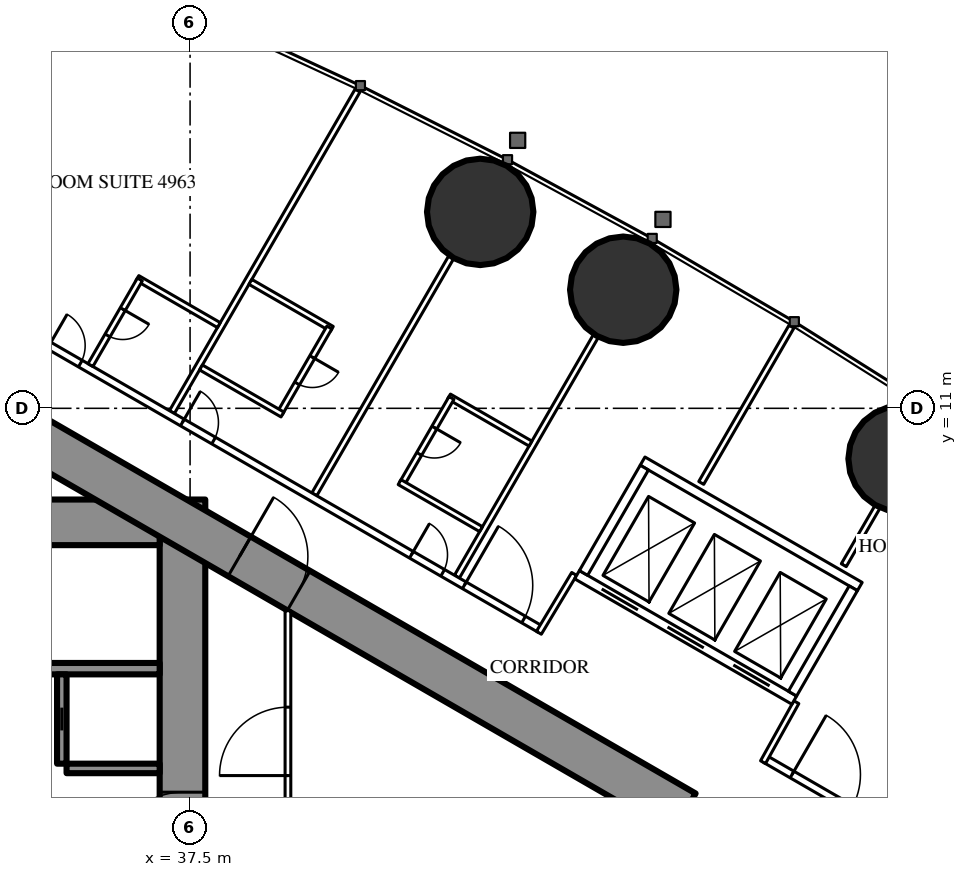
"""IFC4 building model, lengths in metres.
Left out: names, types, materials, properties, quantities, classifications, styles, units other than length and angle.
Written with IfcOpenShell. Run it as: python <this file> out.ifc"""

import sys

from ifc_helpers import new_model, si_unit, direction, frame, frame_2d, origin, origin_2d, place, context, subcontext, project, spatial, rectangle, circle, extrude, element, fill, save


model = new_model("IFC4")
c1 = context("Model", 3, precision=1e-05, world=origin(), true_north=direction((0.0, 1.0)))
c2 = subcontext(c1, "Body", "Model", "MODEL_VIEW")
j1 = project(units=[si_unit("LENGTHUNIT", "METRE"), si_unit("PLANEANGLEUNIT", "RADIAN")], contexts=[c1])
p1 = place(None, origin())
s1 = spatial("IfcSite", under=j1, at=p1, CompositionType="ELEMENT")
p2 = place(p1, origin())
s2 = spatial("IfcBuilding", under=s1, at=p2, CompositionType="ELEMENT")
p3 = place(p2, frame((0.0, 0.0, 184.3)))
s3 = spatial("IfcBuildingStorey", under=s2, at=p3, CompositionType="ELEMENT", Elevation=184.3)
for number, where, z_axis, x_axis in (
    (1, (56.221, 9.672, 0.0), (0.0, 0.0, 1.0), (1.0, 0.0, 0.0)),
    (2, (48.897, 14.121, 0.0), (0.0, 0.0, 1.0), (1.0, 0.0, 0.0)),
    (3, (45.134, 16.168, 0.0), (0.0, 0.0, 1.0), (1.0, 0.0, 0.0)),
):
    element("IfcColumn", number, at=place(p3, frame(where, z_axis=z_axis, x_axis=x_axis)), inside=s3, PredefinedType="COLUMN", context=c2, shape_type="SweptSolid", body=[
        extrude(circle(Radius=1.4, at=origin_2d()), origin(), (0.0, 0.0, 1.0), 3.5),
    ])
p4 = place(p3, frame((37.3, -8.6, 0.0), z_axis=(0.0, 0.0, 1.0), x_axis=(0.0, 1.0, 0.0)))
e4 = element("IfcWall", 4, at=p4, inside=s3, PredefinedType="SHEAR", context=c2, shape_type="SweptSolid", body=[
    extrude(rectangle(XDim=17.2, YDim=1.2, at=frame_2d((8.6, 0.0))), origin(), (0.0, 0.0, 1.0), 3.5),
])
p5 = place(p4, frame((7.7, 0.0, 0.0)))
e5 = element("IfcOpeningElement", 5, at=p5, cuts=e4, PredefinedType="OPENING", context=c2, shape_type="SweptSolid", body=[
    extrude(rectangle(XDim=1.8, YDim=2.2, at=frame_2d((0.9, 1.1))), frame((0.0, 0.61, 0.0), z_axis=(0.0, -1.0, 0.0), x_axis=(1.0, 0.0, 0.0)), (0.0, 0.0, 1.0), 1.22),
])
p6 = place(p3, frame((28.3, 8.0, 0.0), z_axis=(0.0, 0.0, 1.0), x_axis=(1.0, 0.0, 0.0)))
e6 = element("IfcWall", 6, at=p6, inside=s3, PredefinedType="SHEAR", context=c2, shape_type="SweptSolid", body=[
    extrude(rectangle(XDim=8.4, YDim=1.2, at=frame_2d((4.2, 0.0))), origin(), (0.0, 0.0, 1.0), 3.5),
])
p7 = place(p6, frame((0.25, 0.0, 0.0)))
e7 = element("IfcOpeningElement", 7, at=p7, cuts=e6, PredefinedType="OPENING", context=c2, shape_type="SweptSolid", body=[
    extrude(rectangle(XDim=1.0, YDim=2.2, at=frame_2d((0.5, 1.1))), frame((0.0, 0.61, 0.0), z_axis=(0.0, -1.0, 0.0), x_axis=(1.0, 0.0, 0.0)), (0.0, 0.0, 1.0), 1.22),
])
p8 = place(p3, frame((28.3, 4.15, 0.0), z_axis=(0.0, 0.0, 1.0), x_axis=(1.0, 0.0, 0.0)))
e8 = element("IfcWall", 8, at=p8, inside=s3, PredefinedType="SHEAR", context=c2, shape_type="SweptSolid", body=[
    extrude(rectangle(XDim=8.4, YDim=0.3, at=frame_2d((4.2, 0.0))), origin(), (0.0, 0.0, 1.0), 3.5),
])
p9 = place(p3, frame((34.125, 1.65, 0.0), z_axis=(0.0, 0.0, 1.0), x_axis=(0.0, 1.0, 0.0)))
e9 = element("IfcWall", 9, at=p9, inside=s3, PredefinedType="SHEAR", context=c2, shape_type="SweptSolid", body=[
    extrude(rectangle(XDim=2.35, YDim=0.25, at=frame_2d((1.175, 0.0))), origin(), (0.0, 0.0, 1.0), 3.5),
])
p10 = place(p9, frame((0.875, 0.0, 0.0)))
e10 = element("IfcOpeningElement", 10, at=p10, cuts=e9, PredefinedType="OPENING", context=c2, shape_type="SweptSolid", body=[
    extrude(rectangle(XDim=0.6, YDim=2.0, at=frame_2d((0.3, 1.0))), frame((0.0, 0.135, 0.0), z_axis=(0.0, -1.0, 0.0), x_axis=(1.0, 0.0, 0.0)), (0.0, 0.0, 1.0), 0.27),
])
p11 = place(p3, frame((34.25, 1.525, 0.0), z_axis=(0.0, 0.0, 1.0), x_axis=(1.0, 0.0, 0.0)))
e11 = element("IfcWall", 11, at=p11, inside=s3, PredefinedType="SHEAR", context=c2, shape_type="SweptSolid", body=[
    extrude(rectangle(XDim=2.45, YDim=0.25, at=frame_2d((1.225, 0.0))), origin(), (0.0, 0.0, 1.0), 3.5),
])
p12 = place(p3, frame((27.2, 13.8, 0.0), z_axis=(0.0, 0.0, 1.0), x_axis=(0.866024515034, -0.500001539357, 0.0)))
e12 = element("IfcWall", 12, at=p12, inside=s3, PredefinedType="SHEAR", context=c2, shape_type="SweptSolid", body=[
    extrude(rectangle(XDim=26.907, YDim=1.2, at=frame_2d((13.454, 0.0))), origin(), (0.0, 0.0, 1.0), 3.5),
])
p13 = place(p12, frame((4.6, 0.0, 0.0)))
e13 = element("IfcOpeningElement", 13, at=p13, cuts=e12, PredefinedType="OPENING", context=c2, shape_type="SweptSolid", body=[
    extrude(rectangle(XDim=1.0, YDim=2.2, at=frame_2d((0.5, 1.1))), frame((0.0, 0.61, 0.0), z_axis=(0.0, -1.0, 0.0), x_axis=(1.0, 0.0, 0.0)), (0.0, 0.0, 1.0), 1.22),
])
p14 = place(p12, frame((13.395, 0.0, 0.0)))
e14 = element("IfcOpeningElement", 14, at=p14, cuts=e12, PredefinedType="OPENING", context=c2, shape_type="SweptSolid", body=[
    extrude(rectangle(XDim=1.8, YDim=2.2, at=frame_2d((0.9, 1.1))), frame((0.0, 0.61, 0.0), z_axis=(0.0, -1.0, 0.0), x_axis=(1.0, 0.0, 0.0)), (0.0, 0.0, 1.0), 1.22),
])
p15 = place(p3, frame((37.022, 10.9, 0.0), z_axis=(0.0, 0.0, 1.0), x_axis=(0.499998620953, 0.866026199976, 0.0)))
e15 = element("IfcWall", 15, at=p15, inside=s3, PredefinedType="PARTITIONING", context=c2, shape_type="SweptSolid", body=[
    extrude(rectangle(XDim=9.77, YDim=0.15, at=frame_2d((4.885, 0.0))), origin(), (0.0, 0.0, 1.0), 3.25),
])
p16 = place(p3, frame((40.769, 8.737, 0.0), z_axis=(0.0, 0.0, 1.0), x_axis=(0.500013115284, 0.866017831539, 0.0)))
e16 = element("IfcWall", 16, at=p16, inside=s3, PredefinedType="PARTITIONING", context=c2, shape_type="SweptSolid", body=[
    extrude(rectangle(XDim=7.198, YDim=0.15, at=frame_2d((3.599, 0.0))), origin(), (0.0, 0.0, 1.0), 2.3),
])
p17 = place(p3, frame((44.521, 6.571, 0.0), z_axis=(0.0, 0.0, 1.0), x_axis=(0.500020376429, 0.866013639128, 0.0)))
e17 = element("IfcWall", 17, at=p17, inside=s3, PredefinedType="PARTITIONING", context=c2, shape_type="SweptSolid", body=[
    extrude(rectangle(XDim=7.306, YDim=0.15, at=frame_2d((3.653, 0.0))), origin(), (0.0, 0.0, 1.0), 2.3),
])
p18 = place(p3, frame((50.95, 9.037, 0.0), z_axis=(0.0, 0.0, 1.0), x_axis=(0.499988022762, 0.866032318735, 0.0)))
e18 = element("IfcWall", 18, at=p18, inside=s3, PredefinedType="PARTITIONING", context=c2, shape_type="SweptSolid", body=[
    extrude(rectangle(XDim=4.748, YDim=0.15, at=frame_2d((2.374, 0.0))), origin(), (0.0, 0.0, 1.0), 3.25),
])
p19 = place(p3, frame((54.7, 6.872, 0.0), z_axis=(0.0, 0.0, 1.0), x_axis=(0.499989690894, 0.866031355668, 0.0)))
e19 = element("IfcWall", 19, at=p19, inside=s3, PredefinedType="PARTITIONING", context=c2, shape_type="SweptSolid", body=[
    extrude(rectangle(XDim=1.766, YDim=0.15, at=frame_2d((0.883, 0.0))), origin(), (0.0, 0.0, 1.0), 3.25),
])
p20 = place(p3, frame((27.959, 16.017, 0.0), z_axis=(0.0, 0.0, 1.0), x_axis=(0.866027146794, -0.499996981007, 0.0)))
e20 = element("IfcWall", 20, at=p20, inside=s3, PredefinedType="PARTITIONING", context=c2, shape_type="SweptSolid", body=[
    extrude(rectangle(XDim=21.657, YDim=0.2, at=frame_2d((10.829, 0.0))), origin(), (0.0, 0.0, 1.0), 3.25),
])
p21 = place(p20, frame((17.741, 0.0, 0.0)))
e21 = element("IfcOpeningElement", 21, at=p21, cuts=e20, PredefinedType="OPENING", context=c2, shape_type="SweptSolid", body=[
    extrude(rectangle(XDim=0.95, YDim=2.2, at=frame_2d((0.475, 1.1))), frame((0.0, 0.11, 0.0), z_axis=(0.0, -1.0, 0.0), x_axis=(1.0, 0.0, 0.0)), (0.0, 0.0, 1.0), 0.22),
])
p22 = place(p20, frame((10.782, 0.0, 0.0)))
e22 = element("IfcOpeningElement", 22, at=p22, cuts=e20, PredefinedType="OPENING", context=c2, shape_type="SweptSolid", body=[
    extrude(rectangle(XDim=0.95, YDim=2.2, at=frame_2d((0.475, 1.1))), frame((0.0, 0.11, 0.0), z_axis=(0.0, -1.0, 0.0), x_axis=(1.0, 0.0, 0.0)), (0.0, 0.0, 1.0), 0.22),
])
p23 = place(p20, frame((6.732, 0.0, 0.0)))
e23 = element("IfcOpeningElement", 23, at=p23, cuts=e20, PredefinedType="OPENING", context=c2, shape_type="SweptSolid", body=[
    extrude(rectangle(XDim=0.95, YDim=2.2, at=frame_2d((0.475, 1.1))), frame((0.0, 0.11, 0.0), z_axis=(0.0, -1.0, 0.0), x_axis=(1.0, 0.0, 0.0)), (0.0, 0.0, 1.0), 0.22),
])
p24 = place(p20, frame((19.349, 0.0, 0.0)))
e24 = element("IfcOpeningElement", 24, at=p24, cuts=e20, PredefinedType="OPENING", context=c2, shape_type="SweptSolid", body=[
    extrude(rectangle(XDim=1.8, YDim=2.2, at=frame_2d((0.9, 1.1))), frame((0.0, 0.11, 0.0), z_axis=(0.0, -1.0, 0.0), x_axis=(1.0, 0.0, 0.0)), (0.0, 0.0, 1.0), 0.22),
])
p25 = place(p3, frame((52.639, 1.769, 0.0), z_axis=(0.0, 0.0, 1.0), x_axis=(0.866027340901, -0.4999966448, 0.0)))
e25 = element("IfcWall", 25, at=p25, inside=s3, PredefinedType="PARTITIONING", context=c2, shape_type="SweptSolid", body=[
    extrude(rectangle(XDim=3.417, YDim=0.2, at=frame_2d((1.708, 0.0))), origin(), (0.0, 0.0, 1.0), 3.25),
])
p26 = place(p25, frame((0.809, 0.0, 0.0)))
e26 = element("IfcOpeningElement", 26, at=p26, cuts=e25, PredefinedType="OPENING", context=c2, shape_type="SweptSolid", body=[
    extrude(rectangle(XDim=1.8, YDim=2.2, at=frame_2d((0.9, 1.1))), frame((0.0, 0.11, 0.0), z_axis=(0.0, -1.0, 0.0), x_axis=(1.0, 0.0, 0.0)), (0.0, 0.0, 1.0), 0.22),
])
for number, where, z_axis, x_axis in (
    (27, (52.576, 1.689, 0.0), (0.0, 0.0, 1.0), (0.485, 0.874, 0.0)),
    (28, (47.606, 6.643, 0.0), (0.0, 0.0, 1.0), (-0.514, -0.858, 0.0)),
):
    element("IfcWall", number, at=place(p3, frame(where, z_axis=z_axis, x_axis=x_axis)), inside=s3, PredefinedType="PARTITIONING", context=c2, shape_type="SweptSolid", body=[
        extrude(rectangle(XDim=1.805, YDim=0.15, at=frame_2d((0.902, 0.0))), origin(), (0.0, 0.0, 1.0), 3.25),
    ])
p27 = place(p3, frame((44.313, 11.31, 0.0), z_axis=(0.0, 0.0, 1.0), x_axis=(0.866031185235, -0.4999899861, 0.0)))
e29 = element("IfcWall", 29, at=p27, inside=s3, PredefinedType="PARTITIONING", context=c2, shape_type="SweptSolid", body=[
    extrude(rectangle(XDim=2.475, YDim=0.15, at=frame_2d((1.238, 0.0))), origin(), (0.0, 0.0, 1.0), 3.25),
])
p28 = place(p3, frame((43.078, 9.021, 0.0), z_axis=(0.0, 0.0, 1.0), x_axis=(0.49997716683, 0.86603858612, 0.0)))
e30 = element("IfcWall", 30, at=p28, inside=s3, PredefinedType="PARTITIONING", context=c2, shape_type="SweptSolid", body=[
    extrude(rectangle(XDim=2.6, YDim=0.15, at=frame_2d((1.3, 0.0))), origin(), (0.0, 0.0, 1.0), 3.25),
])
p29 = place(p28, frame((0.9, 0.0, 0.0)))
e31 = element("IfcOpeningElement", 31, at=p29, cuts=e30, PredefinedType="OPENING", context=c2, shape_type="SweptSolid", body=[
    extrude(rectangle(XDim=0.8, YDim=2.2, at=frame_2d((0.4, 1.1))), frame((0.0, 0.085, 0.0), z_axis=(0.0, -1.0, 0.0), x_axis=(1.0, 0.0, 0.0)), (0.0, 0.0, 1.0), 0.17),
])
p30 = place(p3, frame((43.013, 9.058, 0.0), z_axis=(0.0, 0.0, 1.0), x_axis=(0.866006523861, -0.500032699561, 0.0)))
e32 = element("IfcWall", 32, at=p30, inside=s3, PredefinedType="PARTITIONING", context=c2, shape_type="SweptSolid", body=[
    extrude(rectangle(XDim=2.475, YDim=0.15, at=frame_2d((1.237, 0.0))), origin(), (0.0, 0.0, 1.0), 2.45),
])
p31 = place(p3, frame((39.087, 14.327, 0.0), z_axis=(0.0, 0.0, 1.0), x_axis=(0.866006523861, -0.500032699561, 0.0)))
e33 = element("IfcWall", 33, at=p31, inside=s3, PredefinedType="PARTITIONING", context=c2, shape_type="SweptSolid", body=[
    extrude(rectangle(XDim=2.475, YDim=0.15, at=frame_2d((1.237, 0.0))), origin(), (0.0, 0.0, 1.0), 3.25),
])
p32 = place(p3, frame((39.865, 10.875, 0.0), z_axis=(0.0, 0.0, 1.0), x_axis=(0.500047596559, 0.865997922154, 0.0)))
e34 = element("IfcWall", 34, at=p32, inside=s3, PredefinedType="PARTITIONING", context=c2, shape_type="SweptSolid", body=[
    extrude(rectangle(XDim=2.6, YDim=0.15, at=frame_2d((1.3, 0.0))), origin(), (0.0, 0.0, 1.0), 3.25),
])
p33 = place(p32, frame((0.9, 0.0, 0.0)))
e35 = element("IfcOpeningElement", 35, at=p33, cuts=e34, PredefinedType="OPENING", context=c2, shape_type="SweptSolid", body=[
    extrude(rectangle(XDim=0.8, YDim=2.2, at=frame_2d((0.4, 1.1))), frame((0.0, 0.085, 0.0), z_axis=(0.0, -1.0, 0.0), x_axis=(1.0, 0.0, 0.0)), (0.0, 0.0, 1.0), 0.17),
])
for number, where, z_axis, x_axis in (
    (36, (37.787, 12.075, 0.0), (0.0, 0.0, 1.0), (0.866, -0.5, 0.0)),
    (37, (36.114, 14.427, 0.0), (0.0, 0.0, 1.0), (0.866, -0.5, 0.0)),
):
    element("IfcWall", number, at=place(p3, frame(where, z_axis=z_axis, x_axis=x_axis)), inside=s3, PredefinedType="PARTITIONING", context=c2, shape_type="SweptSolid", body=[
        extrude(rectangle(XDim=2.475, YDim=0.15, at=frame_2d((1.237, 0.0))), origin(), (0.0, 0.0, 1.0), 3.25),
    ])
p34 = place(p3, frame((34.879, 12.138, 0.0), z_axis=(0.0, 0.0, 1.0), x_axis=(0.500006934395, 0.866021400173, 0.0)))
e38 = element("IfcWall", 38, at=p34, inside=s3, PredefinedType="PARTITIONING", context=c2, shape_type="SweptSolid", body=[
    extrude(rectangle(XDim=2.6, YDim=0.15, at=frame_2d((1.3, 0.0))), origin(), (0.0, 0.0, 1.0), 3.25),
])
p35 = place(p34, frame((0.9, 0.0, 0.0)))
e39 = element("IfcOpeningElement", 39, at=p35, cuts=e38, PredefinedType="OPENING", context=c2, shape_type="SweptSolid", body=[
    extrude(rectangle(XDim=0.8, YDim=2.2, at=frame_2d((0.4, 1.1))), frame((0.0, 0.085, 0.0), z_axis=(0.0, -1.0, 0.0), x_axis=(1.0, 0.0, 0.0)), (0.0, 0.0, 1.0), 0.17),
])
p36 = place(p3, frame((40.075, -1.2, 0.0), z_axis=(0.0, 0.0, 1.0), x_axis=(0.0, 1.0, 0.0)))
e40 = element("IfcWall", 40, at=p36, inside=s3, PredefinedType="PARTITIONING", context=c2, shape_type="SweptSolid", body=[
    extrude(rectangle(XDim=6.874, YDim=0.15, at=frame_2d((3.437, 0.0))), origin(), (0.0, 0.0, 1.0), 3.25),
])
p37 = place(p36, frame((2.537, 0.0, 0.0)))
e41 = element("IfcOpeningElement", 41, at=p37, cuts=e40, PredefinedType="OPENING", context=c2, shape_type="SweptSolid", body=[
    extrude(rectangle(XDim=1.8, YDim=2.2, at=frame_2d((0.9, 1.1))), frame((0.0, 0.085, 0.0), z_axis=(0.0, -1.0, 0.0), x_axis=(1.0, 0.0, 0.0)), (0.0, 0.0, 1.0), 0.17),
])
p38 = place(p3, frame((47.681, 6.622, 0.0), z_axis=(0.0, 0.0, 1.0), x_axis=(0.86603344179, -0.499986077507, 0.0)))
e42 = element("IfcWall", 42, at=p38, inside=s3, PredefinedType="PARTITIONING", context=c2, shape_type="SweptSolid", body=[
    extrude(rectangle(XDim=6.6, YDim=0.25, at=frame_2d((3.3, 0.0))), origin(), (0.0, 0.0, 1.0), 3.25),
])
p39 = place(p38, frame((0.75, 0.0, 0.0)))
e43 = element("IfcOpeningElement", 43, at=p39, cuts=e42, PredefinedType="OPENING", context=c2, shape_type="SweptSolid", body=[
    extrude(rectangle(XDim=1.1, YDim=2.2, at=frame_2d((0.55, 1.1))), frame((0.0, 0.135, 0.0), z_axis=(0.0, -1.0, 0.0), x_axis=(1.0, 0.0, 0.0)), (0.0, 0.0, 1.0), 0.27),
])
p40 = place(p38, frame((2.75, 0.0, 0.0)))
e44 = element("IfcOpeningElement", 44, at=p40, cuts=e42, PredefinedType="OPENING", context=c2, shape_type="SweptSolid", body=[
    extrude(rectangle(XDim=1.1, YDim=2.2, at=frame_2d((0.55, 1.1))), frame((0.0, 0.135, 0.0), z_axis=(0.0, -1.0, 0.0), x_axis=(1.0, 0.0, 0.0)), (0.0, 0.0, 1.0), 0.27),
])
p41 = place(p38, frame((4.75, 0.0, 0.0)))
e45 = element("IfcOpeningElement", 45, at=p41, cuts=e42, PredefinedType="OPENING", context=c2, shape_type="SweptSolid", body=[
    extrude(rectangle(XDim=1.1, YDim=2.2, at=frame_2d((0.55, 1.1))), frame((0.0, 0.135, 0.0), z_axis=(0.0, -1.0, 0.0), x_axis=(1.0, 0.0, 0.0)), (0.0, 0.0, 1.0), 0.27),
])
p42 = place(p3, frame((49.406, 9.611, 0.0), z_axis=(0.0, 0.0, 1.0), x_axis=(0.86603344179, -0.499986077507, 0.0)))
e46 = element("IfcWall", 46, at=p42, inside=s3, PredefinedType="PARTITIONING", context=c2, shape_type="SweptSolid", body=[
    extrude(rectangle(XDim=6.6, YDim=0.25, at=frame_2d((3.3, 0.0))), origin(), (0.0, 0.0, 1.0), 3.25),
])
p43 = place(p3, frame((47.852, 6.668, 0.0), z_axis=(0.0, 0.0, 1.0), x_axis=(0.499929347863, 0.866066190972, 0.0)))
e47 = element("IfcWall", 47, at=p43, inside=s3, PredefinedType="PARTITIONING", context=c2, shape_type="SweptSolid", body=[
    extrude(rectangle(XDim=3.201, YDim=0.25, at=frame_2d((1.6, 0.0))), origin(), (0.0, 0.0, 1.0), 3.25),
])
p44 = place(p3, frame((53.352, 3.493, 0.0), z_axis=(0.0, 0.0, 1.0), x_axis=(0.499872130319, 0.866099216793, 0.0)))
e48 = element("IfcWall", 48, at=p44, inside=s3, PredefinedType="PARTITIONING", context=c2, shape_type="SweptSolid", body=[
    extrude(rectangle(XDim=3.2, YDim=0.25, at=frame_2d((1.6, 0.0))), origin(), (0.0, 0.0, 1.0), 3.25),
])
p45 = place(p29, origin())
e49 = element("IfcDoor", 49, at=p45, inside=s3, OperationType="SINGLE_SWING_RIGHT", PredefinedType="DOOR", context=c2, shape_type="SweptSolid", body=[
    extrude(rectangle(XDim=0.8, YDim=2.2, at=frame_2d((0.4, 1.1))), frame((0.0, 0.025, 0.0), z_axis=(0.0, -1.0, 0.0), x_axis=(1.0, 0.0, 0.0)), (0.0, 0.0, 1.0), 0.05),
])
fill(e31, e49)
p46 = place(p21, origin())
e50 = element("IfcDoor", 50, at=p46, inside=s3, OperationType="SINGLE_SWING_LEFT", PredefinedType="DOOR", context=c2, shape_type="SweptSolid", body=[
    extrude(rectangle(XDim=0.95, YDim=2.2, at=frame_2d((0.475, 1.1))), frame((0.0, 0.025, 0.0), z_axis=(0.0, -1.0, 0.0), x_axis=(1.0, 0.0, 0.0)), (0.0, 0.0, 1.0), 0.05),
])
fill(e21, e50)
p47 = place(p33, origin())
e51 = element("IfcDoor", 51, at=p47, inside=s3, OperationType="SINGLE_SWING_RIGHT", PredefinedType="DOOR", context=c2, shape_type="SweptSolid", body=[
    extrude(rectangle(XDim=0.8, YDim=2.2, at=frame_2d((0.4, 1.1))), frame((0.0, 0.025, 0.0), z_axis=(0.0, -1.0, 0.0), x_axis=(1.0, 0.0, 0.0)), (0.0, 0.0, 1.0), 0.05),
])
fill(e35, e51)
p48 = place(p22, origin())
e52 = element("IfcDoor", 52, at=p48, inside=s3, OperationType="SINGLE_SWING_LEFT", PredefinedType="DOOR", context=c2, shape_type="SweptSolid", body=[
    extrude(rectangle(XDim=0.95, YDim=2.2, at=frame_2d((0.475, 1.1))), frame((0.0, 0.025, 0.0), z_axis=(0.0, -1.0, 0.0), x_axis=(1.0, 0.0, 0.0)), (0.0, 0.0, 1.0), 0.05),
])
fill(e22, e52)
p49 = place(p35, origin())
e53 = element("IfcDoor", 53, at=p49, inside=s3, OperationType="SINGLE_SWING_RIGHT", PredefinedType="DOOR", context=c2, shape_type="SweptSolid", body=[
    extrude(rectangle(XDim=0.8, YDim=2.2, at=frame_2d((0.4, 1.1))), frame((0.0, 0.025, 0.0), z_axis=(0.0, -1.0, 0.0), x_axis=(1.0, 0.0, 0.0)), (0.0, 0.0, 1.0), 0.05),
])
fill(e39, e53)
p50 = place(p23, origin())
e54 = element("IfcDoor", 54, at=p50, inside=s3, OperationType="SINGLE_SWING_LEFT", PredefinedType="DOOR", context=c2, shape_type="SweptSolid", body=[
    extrude(rectangle(XDim=0.95, YDim=2.2, at=frame_2d((0.475, 1.1))), frame((0.0, 0.025, 0.0), z_axis=(0.0, -1.0, 0.0), x_axis=(1.0, 0.0, 0.0)), (0.0, 0.0, 1.0), 0.05),
])
fill(e23, e54)
p51 = place(p26, origin())
e55 = element("IfcDoor", 55, at=p51, inside=s3, OperationType="DOUBLE_DOOR_SINGLE_SWING", PredefinedType="DOOR", context=c2, shape_type="SweptSolid", body=[
    extrude(rectangle(XDim=1.8, YDim=2.2, at=frame_2d((0.9, 1.1))), frame((0.0, 0.025, 0.0), z_axis=(0.0, -1.0, 0.0), x_axis=(1.0, 0.0, 0.0)), (0.0, 0.0, 1.0), 0.05),
])
fill(e26, e55)
p52 = place(p24, origin())
e56 = element("IfcDoor", 56, at=p52, inside=s3, OperationType="DOUBLE_DOOR_SINGLE_SWING", PredefinedType="DOOR", context=c2, shape_type="SweptSolid", body=[
    extrude(rectangle(XDim=1.8, YDim=2.2, at=frame_2d((0.9, 1.1))), frame((0.0, 0.025, 0.0), z_axis=(0.0, -1.0, 0.0), x_axis=(1.0, 0.0, 0.0)), (0.0, 0.0, 1.0), 0.05),
])
fill(e24, e56)
p53 = place(p37, origin())
e57 = element("IfcDoor", 57, at=p53, inside=s3, OperationType="DOUBLE_DOOR_SINGLE_SWING", PredefinedType="DOOR", context=c2, shape_type="SweptSolid", body=[
    extrude(rectangle(XDim=1.8, YDim=2.2, at=frame_2d((0.9, 1.1))), frame((0.0, 0.025, 0.0), z_axis=(0.0, -1.0, 0.0), x_axis=(1.0, 0.0, 0.0)), (0.0, 0.0, 1.0), 0.05),
])
fill(e41, e57)
p54 = place(p14, origin())
e58 = element("IfcDoor", 58, at=p54, inside=s3, OperationType="DOUBLE_DOOR_SINGLE_SWING", PredefinedType="DOOR", context=c2, shape_type="SweptSolid", body=[
    extrude(rectangle(XDim=1.8, YDim=2.2, at=frame_2d((0.9, 1.1))), frame((0.0, 0.025, 0.0), z_axis=(0.0, -1.0, 0.0), x_axis=(1.0, 0.0, 0.0)), (0.0, 0.0, 1.0), 0.05),
])
fill(e14, e58)
p55 = place(p5, origin())
e59 = element("IfcDoor", 59, at=p55, inside=s3, OperationType="DOUBLE_DOOR_SINGLE_SWING", PredefinedType="DOOR", context=c2, shape_type="SweptSolid", body=[
    extrude(rectangle(XDim=1.8, YDim=2.2, at=frame_2d((0.9, 1.1))), frame((0.0, 0.025, 0.0), z_axis=(0.0, -1.0, 0.0), x_axis=(1.0, 0.0, 0.0)), (0.0, 0.0, 1.0), 0.05),
])
fill(e5, e59)
p56 = place(p10, origin())
e60 = element("IfcDoor", 60, at=p56, inside=s3, OperationType="SLIDING_TO_LEFT", PredefinedType="DOOR", context=c2, shape_type="SweptSolid", body=[
    extrude(rectangle(XDim=0.6, YDim=2.0, at=frame_2d((0.3, 1.0))), frame((0.0, 0.025, 0.0), z_axis=(0.0, -1.0, 0.0), x_axis=(1.0, 0.0, 0.0)), (0.0, 0.0, 1.0), 0.05),
])
fill(e10, e60)
p57 = place(p39, origin())
e61 = element("IfcDoor", 61, at=p57, inside=s3, OperationType="DOUBLE_DOOR_SLIDING", PredefinedType="USERDEFINED", context=c2, shape_type="SweptSolid", body=[
    extrude(rectangle(XDim=1.1, YDim=2.2, at=frame_2d((0.55, 1.1))), frame((0.0, 0.025, 0.0), z_axis=(0.0, -1.0, 0.0), x_axis=(1.0, 0.0, 0.0)), (0.0, 0.0, 1.0), 0.05),
])
fill(e43, e61)
p58 = place(p40, origin())
e62 = element("IfcDoor", 62, at=p58, inside=s3, OperationType="DOUBLE_DOOR_SLIDING", PredefinedType="USERDEFINED", context=c2, shape_type="SweptSolid", body=[
    extrude(rectangle(XDim=1.1, YDim=2.2, at=frame_2d((0.55, 1.1))), frame((0.0, 0.025, 0.0), z_axis=(0.0, -1.0, 0.0), x_axis=(1.0, 0.0, 0.0)), (0.0, 0.0, 1.0), 0.05),
])
fill(e44, e62)
p59 = place(p41, origin())
e63 = element("IfcDoor", 63, at=p59, inside=s3, OperationType="DOUBLE_DOOR_SLIDING", PredefinedType="USERDEFINED", context=c2, shape_type="SweptSolid", body=[
    extrude(rectangle(XDim=1.1, YDim=2.2, at=frame_2d((0.55, 1.1))), frame((0.0, 0.025, 0.0), z_axis=(0.0, -1.0, 0.0), x_axis=(1.0, 0.0, 0.0)), (0.0, 0.0, 1.0), 0.05),
])
fill(e45, e63)
save(model, sys.argv[1])
